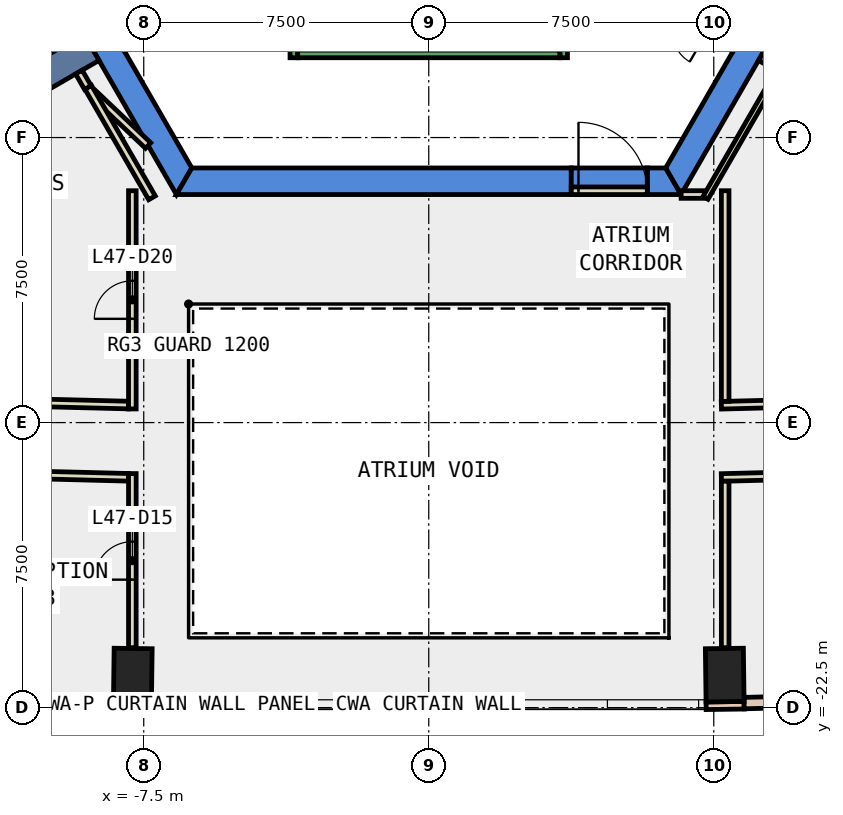
"""IFC4 building model, lengths in metres.
Left out: names, types, materials, properties, quantities, classifications, styles, units other than length and angle.
Written with IfcOpenShell. Run it as: python <this file> out.ifc"""

import sys

from ifc_helpers import new_model, si_unit, direction, frame, frame_2d, origin, origin_2d, place, context, subcontext, project, spatial, polyline, rectangle, outline, extrude, element, fill, save


model = new_model("IFC4")
c1 = context("Model", 3, precision=1e-05, world=origin(), true_north=direction((0.0, 1.0)))
c2 = subcontext(c1, "Body", "Model", "MODEL_VIEW")
j1 = project(units=[si_unit("LENGTHUNIT", "METRE"), si_unit("PLANEANGLEUNIT", "RADIAN")], contexts=[c1])
p1 = place(None, origin())
s1 = spatial("IfcSite", under=j1, at=p1, CompositionType="ELEMENT")
p2 = place(p1, origin())
s2 = spatial("IfcBuilding", under=s1, at=p2, CompositionType="ELEMENT")
p3 = place(p2, frame((0.0, 0.0, 210.8)))
s3 = spatial("IfcBuildingStorey", under=s2, at=p3, CompositionType="ELEMENT", Elevation=210.8)
for number, where, z_axis, x_axis in (
    (1, (-7.788, -21.644, -0.4), (0.0, 0.0, 1.0), (-1.0, 0.013, 0.0)),
    (2, (7.788, -21.644, -0.4), (0.0, 0.0, 1.0), (1.0, 0.013, 0.0)),
):
    element("IfcColumn", number, at=place(p3, frame(where, z_axis=z_axis, x_axis=x_axis)), inside=s3, PredefinedType="COLUMN", context=c2, shape_type="SweptSolid", body=[
        extrude(rectangle(XDim=1.0, YDim=1.4, at=origin_2d()), origin(), (0.0, 0.0, 1.0), 4.2),
    ])
p4 = place(p3, frame((0.0, 0.0, -0.4)))
e3 = element("IfcWall", 3, at=p4, inside=s3, PredefinedType="SHEAR", context=c2, shape_type="SweptSolid", body=[
    extrude(outline(polyline([(-13.279, 2.5), (-6.64, -9.0), (-6.235, -8.3), (-12.471, 2.5), (-13.279, 2.5)])), origin(), (0.0, 0.0, 1.0), 4.2),
])
p5 = place(p3, frame((0.0, 0.0, -0.4)))
e4 = element("IfcWall", 4, at=p5, inside=s3, PredefinedType="SHEAR", context=c2, shape_type="SweptSolid", body=[
    extrude(outline(polyline([(3.75, -9.0), (3.75, -8.3), (-6.235, -8.3), (-6.64, -9.0), (3.75, -9.0)])), origin(), (0.0, 0.0, 1.0), 4.2),
])
p6 = place(p3, frame((0.0, 0.0, -0.4)))
e5 = element("IfcWall", 5, at=p6, inside=s3, PredefinedType="SHEAR", context=c2, shape_type="SweptSolid", body=[
    extrude(outline(polyline([(5.75, -8.3), (5.75, -9.0), (6.64, -9.0), (6.235, -8.3), (5.75, -8.3)])), origin(), (0.0, 0.0, 1.0), 4.2),
])
p7 = place(p3, frame((0.0, 0.0, 3.6)))
e6 = element("IfcWall", 6, at=p7, inside=s3, PredefinedType="SHEAR", context=c2, shape_type="SweptSolid", body=[
    extrude(outline(polyline([(5.75, -9.0), (5.75, -8.3), (3.75, -8.3), (3.75, -9.0), (5.75, -9.0)])), origin(), (0.0, 0.0, 1.0), 0.2),
])
p8 = place(p3, frame((0.0, 0.0, -0.4)))
e7 = element("IfcWall", 7, at=p8, inside=s3, PredefinedType="SHEAR", context=c2, shape_type="SweptSolid", body=[
    extrude(outline(polyline([(6.64, -9.0), (13.279, 2.5), (12.471, 2.5), (6.235, -8.3), (6.64, -9.0)])), origin(), (0.0, 0.0, 1.0), 4.2),
])
for number, where, z_axis, x_axis in (
    (8, (8.877, -5.125, -0.4), (0.0, 0.0, 1.0), (0.866, -0.5, 0.0)),
    (9, (-8.877, -5.125, -0.4), (0.0, 0.0, 1.0), (-0.866, -0.5, 0.0)),
):
    element("IfcWall", number, at=place(p3, frame(where, z_axis=z_axis, x_axis=x_axis)), inside=s3, PredefinedType="SHEAR", context=c2, shape_type="SweptSolid", body=[
        extrude(rectangle(XDim=9.0, YDim=0.8, at=frame_2d((4.5, 0.0))), origin(), (0.0, 0.0, 1.0), 4.2),
    ])
for number, where, z_axis, x_axis in (
    (10, (-8.299, -22.437, 0.0), (0.0, 0.0, 1.0), (1.0, -0.014, 0.0)),
    (11, (7.299, -22.451, 0.0), (0.0, 0.0, 1.0), (1.0, 0.014, 0.0)),
):
    element("IfcWall", number, at=place(p3, frame(where, z_axis=z_axis, x_axis=x_axis)), inside=s3, PredefinedType="STANDARD", context=c2, shape_type="SweptSolid", body=[
        extrude(rectangle(XDim=1.0, YDim=0.2, at=frame_2d((0.5, 0.0))), origin(), (0.0, 0.0, 1.0), 3.8),
    ])
p9 = place(p3, frame((-13.681, -22.246, 0.0), z_axis=(0.0, 0.0, 1.0), x_axis=(0.999685717988, -0.025069209235, 0.0)))
e12 = element("IfcWall", 12, at=p9, inside=s3, PredefinedType="STANDARD", context=c2, shape_type="SweptSolid", body=[
    extrude(rectangle(XDim=5.385, YDim=0.3, at=frame_2d((2.693, 0.0))), origin(), (0.0, 0.0, 1.0), 3.8),
])
p10 = place(p9, frame((0.646, 0.0, 0.9)))
e13 = element("IfcOpeningElement", 13, at=p10, cuts=e12, PredefinedType="OPENING", context=c2, shape_type="SweptSolid", body=[
    extrude(rectangle(XDim=1.4, YDim=2.6, at=frame_2d((0.7, 1.3))), frame((0.0, 0.16, 0.0), z_axis=(0.0, -1.0, 0.0), x_axis=(1.0, 0.0, 0.0)), (0.0, 0.0, 1.0), 0.32),
])
p11 = place(p9, frame((3.339, 0.0, 0.9)))
e14 = element("IfcOpeningElement", 14, at=p11, cuts=e12, PredefinedType="OPENING", context=c2, shape_type="SweptSolid", body=[
    extrude(rectangle(XDim=1.4, YDim=2.6, at=frame_2d((0.7, 1.3))), frame((0.0, 0.16, 0.0), z_axis=(0.0, -1.0, 0.0), x_axis=(1.0, 0.0, 0.0)), (0.0, 0.0, 1.0), 0.32),
])
p12 = place(p3, frame((8.297, -22.381, 0.0), z_axis=(0.0, 0.0, 1.0), x_axis=(0.999685717988, 0.025069209235, 0.0)))
e15 = element("IfcWall", 15, at=p12, inside=s3, PredefinedType="STANDARD", context=c2, shape_type="SweptSolid", body=[
    extrude(rectangle(XDim=5.385, YDim=0.3, at=frame_2d((2.693, 0.0))), origin(), (0.0, 0.0, 1.0), 3.8),
])
p13 = place(p12, frame((0.646, 0.0, 0.9)))
e16 = element("IfcOpeningElement", 16, at=p13, cuts=e15, PredefinedType="OPENING", context=c2, shape_type="SweptSolid", body=[
    extrude(rectangle(XDim=1.4, YDim=2.6, at=frame_2d((0.7, 1.3))), frame((0.0, 0.16, 0.0), z_axis=(0.0, -1.0, 0.0), x_axis=(1.0, 0.0, 0.0)), (0.0, 0.0, 1.0), 0.32),
])
p14 = place(p12, frame((3.339, 0.0, 0.9)))
e17 = element("IfcOpeningElement", 17, at=p14, cuts=e15, PredefinedType="OPENING", context=c2, shape_type="SweptSolid", body=[
    extrude(rectangle(XDim=1.4, YDim=2.6, at=frame_2d((0.7, 1.3))), frame((0.0, 0.16, 0.0), z_axis=(0.0, -1.0, 0.0), x_axis=(1.0, 0.0, 0.0)), (0.0, 0.0, 1.0), 0.32),
])
p15 = place(p3, frame((7.7, -14.544, 0.0), z_axis=(0.0, 0.0, 1.0), x_axis=(0.99968218628, 0.025209649611, 0.0)))
e18 = element("IfcWall", 18, at=p15, inside=s3, PredefinedType="PARTITIONING", context=c2, shape_type="SweptSolid", body=[
    extrude(rectangle(XDim=6.227, YDim=0.2, at=frame_2d((3.114, 0.0))), origin(), (0.0, 0.0, 1.0), 3.8),
])
p16 = place(p3, frame((-11.009, -14.461, 0.0), z_axis=(0.0, 0.0, 1.0), x_axis=(0.999684451251, -0.025119672116, 0.0)))
e19 = element("IfcWall", 19, at=p16, inside=s3, PredefinedType="PARTITIONING", context=c2, shape_type="SweptSolid", body=[
    extrude(rectangle(XDim=3.11, YDim=0.2, at=frame_2d((1.555, 0.0))), origin(), (0.0, 0.0, 1.0), 3.8),
])
p17 = place(p3, frame((14.061, -16.284, 0.0), z_axis=(0.0, 0.0, 1.0), x_axis=(-0.999679323762, -0.025322907453, 0.0)))
e20 = element("IfcWall", 20, at=p17, inside=s3, PredefinedType="PARTITIONING", context=c2, shape_type="SweptSolid", body=[
    extrude(rectangle(XDim=6.363, YDim=0.2, at=frame_2d((3.182, 0.0))), origin(), (0.0, 0.0, 1.0), 3.8),
])
p18 = place(p17, frame((2.682, 0.0, 0.0)))
e21 = element("IfcOpeningElement", 21, at=p18, cuts=e20, PredefinedType="OPENING", context=c2, shape_type="SweptSolid", body=[
    extrude(rectangle(XDim=1.0, YDim=2.1, at=frame_2d((0.5, 1.05))), frame((0.0, 0.11, 0.0), z_axis=(0.0, -1.0, 0.0), x_axis=(1.0, 0.0, 0.0)), (0.0, 0.0, 1.0), 0.22),
])
p19 = place(p3, frame((-7.9, -16.44, 0.0), z_axis=(0.0, 0.0, 1.0), x_axis=(-0.999675117104, 0.025488433531, 0.0)))
e22 = element("IfcWall", 22, at=p19, inside=s3, PredefinedType="PARTITIONING", context=c2, shape_type="SweptSolid", body=[
    extrude(rectangle(XDim=2.864, YDim=0.2, at=frame_2d((1.432, 0.0))), origin(), (0.0, 0.0, 1.0), 3.8),
])
p20 = place(p3, frame((6.641, -8.999, 0.0), z_axis=(0.0, 0.0, 1.0), x_axis=(1.0, 0.0, 0.0)))
e23 = element("IfcWall", 23, at=p20, inside=s3, PredefinedType="PARTITIONING", context=c2, shape_type="SweptSolid", body=[
    extrude(rectangle(XDim=0.617, YDim=0.2, at=frame_2d((0.309, 0.0))), origin(), (0.0, 0.0, 1.0), 3.8),
])
p21 = place(p3, frame((7.283, -9.086, 0.0), z_axis=(0.0, 0.0, 1.0), x_axis=(0.500035303972, 0.866005020067, 0.0)))
e24 = element("IfcWall", 24, at=p21, inside=s3, PredefinedType="PARTITIONING", context=c2, shape_type="SweptSolid", body=[
    extrude(rectangle(XDim=3.828, YDim=0.15, at=frame_2d((1.914, 0.0))), origin(), (0.0, 0.0, 1.0), 3.8),
])
p22 = place(p3, frame((7.8, -8.899, 0.0), z_axis=(0.0, 0.0, 1.0), x_axis=(0.0, -1.0, 0.0)))
e25 = element("IfcWall", 25, at=p22, inside=s3, PredefinedType="PARTITIONING", context=c2, shape_type="SweptSolid", body=[
    extrude(rectangle(XDim=5.542, YDim=0.2, at=frame_2d((2.771, 0.0))), origin(), (0.0, 0.0, 1.0), 3.8),
])
p23 = place(p3, frame((-8.84, -6.332, 0.0), z_axis=(0.0, 0.0, 1.0), x_axis=(0.726080635734, -0.687609562479, 0.0)))
e26 = element("IfcWall", 26, at=p23, inside=s3, PredefinedType="PARTITIONING", context=c2, shape_type="SweptSolid", body=[
    extrude(rectangle(XDim=2.005, YDim=0.2, at=frame_2d((1.003, 0.0))), origin(), (0.0, 0.0, 1.0), 3.8),
])
p24 = place(p3, frame((-7.8, -14.641, 0.0), z_axis=(0.0, 0.0, 1.0), x_axis=(0.0, 1.0, 0.0)))
e27 = element("IfcWall", 27, at=p24, inside=s3, PredefinedType="PARTITIONING", context=c2, shape_type="SweptSolid", body=[
    extrude(rectangle(XDim=5.742, YDim=0.2, at=frame_2d((2.871, 0.0))), origin(), (0.0, 0.0, 1.0), 3.8),
])
p25 = place(p24, frame((2.371, 0.0, 0.0)))
e28 = element("IfcOpeningElement", 28, at=p25, cuts=e27, PredefinedType="OPENING", context=c2, shape_type="SweptSolid", body=[
    extrude(rectangle(XDim=1.0, YDim=2.1, at=frame_2d((0.5, 1.05))), frame((0.0, 0.11, 0.0), z_axis=(0.0, -1.0, 0.0), x_axis=(1.0, 0.0, 0.0)), (0.0, 0.0, 1.0), 0.22),
])
p26 = place(p3, frame((-7.283, -9.086, 0.0), z_axis=(0.0, 0.0, 1.0), x_axis=(-0.499883958536, 0.86609238999, 0.0)))
e29 = element("IfcWall", 29, at=p26, inside=s3, PredefinedType="PARTITIONING", context=c2, shape_type="SweptSolid", body=[
    extrude(rectangle(XDim=3.359, YDim=0.2, at=frame_2d((1.679, 0.0))), origin(), (0.0, 0.0, 1.0), 3.8),
])
p27 = place(p3, frame((7.8, -16.542, 0.0), z_axis=(0.0, 0.0, 1.0), x_axis=(0.0, -1.0, 0.0)))
e30 = element("IfcWall", 30, at=p27, inside=s3, PredefinedType="PARTITIONING", context=c2, shape_type="SweptSolid", body=[
    extrude(rectangle(XDim=4.382, YDim=0.2, at=frame_2d((2.191, 0.0))), origin(), (0.0, 0.0, 1.0), 3.8),
])
p28 = place(p3, frame((-7.8, -20.924, 0.0), z_axis=(0.0, 0.0, 1.0), x_axis=(0.0, 1.0, 0.0)))
e31 = element("IfcWall", 31, at=p28, inside=s3, PredefinedType="PARTITIONING", context=c2, shape_type="SweptSolid", body=[
    extrude(rectangle(XDim=4.582, YDim=0.2, at=frame_2d((2.291, 0.0))), origin(), (0.0, 0.0, 1.0), 3.8),
])
p29 = place(p28, frame((1.791, 0.0, 0.0)))
e32 = element("IfcOpeningElement", 32, at=p29, cuts=e31, PredefinedType="OPENING", context=c2, shape_type="SweptSolid", body=[
    extrude(rectangle(XDim=1.0, YDim=2.1, at=frame_2d((0.5, 1.05))), frame((0.0, 0.11, 0.0), z_axis=(0.0, -1.0, 0.0), x_axis=(1.0, 0.0, 0.0)), (0.0, 0.0, 1.0), 0.22),
])
p30 = place(p3, frame((-8.973, -6.183, 0.0), z_axis=(0.0, 0.0, 1.0), x_axis=(-0.499557093027, 0.86628096528, 0.0)))
e33 = element("IfcWall", 33, at=p30, inside=s3, PredefinedType="PARTITIONING", context=c2, shape_type="SweptSolid", body=[
    extrude(rectangle(XDim=0.469, YDim=0.2, at=frame_2d((0.234, 0.0))), origin(), (0.0, 0.0, 1.0), 3.8),
])
p31 = place(p3, frame((3.75, -8.9, 0.0), z_axis=(0.0, 0.0, 1.0), x_axis=(1.0, 0.0, 0.0)))
e34 = element("IfcWall", 34, at=p31, inside=s3, PredefinedType="PARTITIONING", context=c2, shape_type="SweptSolid", body=[
    extrude(rectangle(XDim=2.0, YDim=0.2, at=frame_2d((1.0, 0.0))), origin(), (0.0, 0.0, 1.0), 2.4),
])
p32 = place(p31, frame((0.19, 0.0, 0.0)))
e35 = element("IfcOpeningElement", 35, at=p32, cuts=e34, PredefinedType="OPENING", context=c2, shape_type="SweptSolid", body=[
    extrude(rectangle(XDim=1.8, YDim=2.1, at=frame_2d((0.9, 1.05))), frame((0.0, 0.11, 0.0), z_axis=(0.0, -1.0, 0.0), x_axis=(1.0, 0.0, 0.0)), (0.0, 0.0, 1.0), 0.22),
])
p33 = place(p3, frame((-3.55, -1.0, 0.0), z_axis=(0.0, 0.0, 1.0), x_axis=(0.0, -1.0, 0.0)))
e36 = element("IfcWall", 36, at=p33, inside=s3, PredefinedType="STANDARD", context=c2, shape_type="SweptSolid", body=[
    extrude(rectangle(XDim=4.4, YDim=0.2, at=frame_2d((2.2, 0.0))), origin(), (0.0, 0.0, 1.0), 3.8),
])
p34 = place(p33, frame((2.4, 0.0, 0.0)))
e37 = element("IfcOpeningElement", 37, at=p34, cuts=e36, PredefinedType="OPENING", context=c2, shape_type="SweptSolid", body=[
    extrude(rectangle(XDim=1.1, YDim=2.2, at=frame_2d((0.55, 1.1))), frame((0.0, 0.11, 0.0), z_axis=(0.0, -1.0, 0.0), x_axis=(1.0, 0.0, 0.0)), (0.0, 0.0, 1.0), 0.22),
])
p35 = place(p3, frame((3.55, -2.667, 0.0), z_axis=(0.0, 0.0, 1.0), x_axis=(0.0, -1.0, 0.0)))
e38 = element("IfcWall", 38, at=p35, inside=s3, PredefinedType="STANDARD", context=c2, shape_type="SweptSolid", body=[
    extrude(rectangle(XDim=2.733, YDim=0.2, at=frame_2d((1.366, 0.0))), origin(), (0.0, 0.0, 1.0), 3.8),
])
p36 = place(p3, frame((-3.45, -5.3, 0.0), z_axis=(0.0, 0.0, 1.0), x_axis=(1.0, 0.0, 0.0)))
e39 = element("IfcWall", 39, at=p36, inside=s3, PredefinedType="STANDARD", context=c2, shape_type="SweptSolid", body=[
    extrude(rectangle(XDim=6.9, YDim=0.2, at=frame_2d((3.45, 0.0))), origin(), (0.0, 0.0, 1.0), 3.8),
])
p37 = place(p11, origin())
e40 = element("IfcWindow", 40, at=p37, inside=s3, PartitioningType="SINGLE_PANEL", PredefinedType="WINDOW", context=c2, shape_type="SweptSolid", body=[
    extrude(rectangle(XDim=1.4, YDim=2.6, at=frame_2d((0.7, 1.3))), frame((0.0, 0.03, 0.0), z_axis=(0.0, -1.0, 0.0), x_axis=(1.0, 0.0, 0.0)), (0.0, 0.0, 1.0), 0.06),
])
fill(e14, e40)
p38 = place(p29, origin())
e41 = element("IfcDoor", 41, at=p38, inside=s3, OperationType="SINGLE_SWING_LEFT", PredefinedType="DOOR", context=c2, shape_type="SweptSolid", body=[
    extrude(rectangle(XDim=1.0, YDim=2.1, at=frame_2d((0.5, 1.05))), frame((0.0, 0.025, 0.0), z_axis=(0.0, -1.0, 0.0), x_axis=(1.0, 0.0, 0.0)), (0.0, 0.0, 1.0), 0.05),
])
fill(e32, e41)
p39 = place(p25, origin())
e42 = element("IfcDoor", 42, at=p39, inside=s3, OperationType="SINGLE_SWING_LEFT", PredefinedType="DOOR", context=c2, shape_type="SweptSolid", body=[
    extrude(rectangle(XDim=1.0, YDim=2.1, at=frame_2d((0.5, 1.05))), frame((0.0, 0.025, 0.0), z_axis=(0.0, -1.0, 0.0), x_axis=(1.0, 0.0, 0.0)), (0.0, 0.0, 1.0), 0.05),
])
fill(e28, e42)
p40 = place(p32, origin())
e43 = element("IfcDoor", 43, at=p40, inside=s3, OperationType="DOUBLE_DOOR_SINGLE_SWING", PredefinedType="DOOR", context=c2, shape_type="SweptSolid", body=[
    extrude(rectangle(XDim=1.8, YDim=2.1, at=frame_2d((0.9, 1.05))), frame((0.0, 0.025, 0.0), z_axis=(0.0, -1.0, 0.0), x_axis=(1.0, 0.0, 0.0)), (0.0, 0.0, 1.0), 0.05),
])
fill(e35, e43)
save(model, sys.argv[1])
